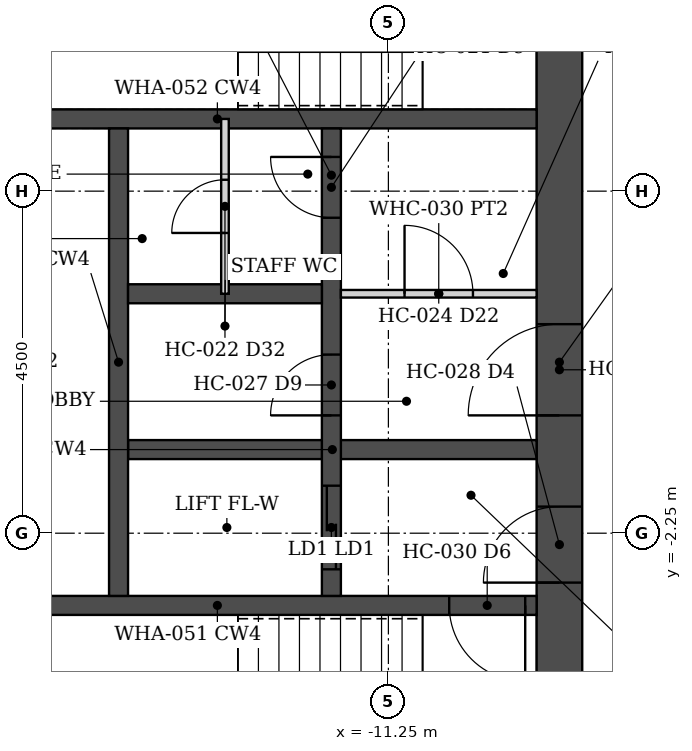
"""IFC4 building model, lengths in metres.
Left out: names, types, materials, properties, quantities, classifications, styles, units other than length and angle.
Written with IfcOpenShell. Run it as: python <this file> out.ifc"""

import sys

from ifc_helpers import new_model, si_unit, direction, frame, frame_2d, origin, place, context, subcontext, project, spatial, rectangle, extrude, element, fill, save


model = new_model("IFC4")
c1 = context("Model", 3, precision=1e-05, world=origin(), true_north=direction((0.0, 1.0)))
c2 = subcontext(c1, "Body", "Model", "MODEL_VIEW")
j1 = project(units=[si_unit("LENGTHUNIT", "METRE"), si_unit("PLANEANGLEUNIT", "RADIAN")], contexts=[c1])
p1 = place(None, origin())
s1 = spatial("IfcSite", under=j1, at=p1, CompositionType="ELEMENT")
p2 = place(p1, origin())
s2 = spatial("IfcBuilding", under=s1, at=p2, CompositionType="ELEMENT")
p3 = place(p2, frame((0.0, 0.0, 140.0)))
s3 = spatial("IfcBuildingStorey", under=s2, at=p3, CompositionType="ELEMENT", Elevation=140.0)
p4 = place(p3, frame((-9.0, -6.45, 0.0), z_axis=(0.0, 0.0, 1.0), x_axis=(0.0, 1.0, 0.0)))
e1 = element("IfcWall", 1, at=p4, inside=s3, PredefinedType="SHEAR", context=c2, shape_type="SweptSolid", body=[
    extrude(rectangle(XDim=12.9, YDim=0.6, at=frame_2d((6.45, 0.0))), origin(), (0.0, 0.0, 1.0), 3.6),
])
p5 = place(p4, frame((3.55, 0.0, 0.0)))
e2 = element("IfcOpeningElement", 2, at=p5, cuts=e1, PredefinedType="OPENING", context=c2, shape_type="SweptSolid", body=[
    extrude(rectangle(XDim=1.0, YDim=2.1, at=frame_2d((0.5, 1.05))), frame((0.0, 0.31, 0.0), z_axis=(0.0, -1.0, 0.0), x_axis=(1.0, 0.0, 0.0)), (0.0, 0.0, 1.0), 0.62),
])
p6 = place(p4, frame((5.75, 0.0, 0.0)))
e3 = element("IfcOpeningElement", 3, at=p6, cuts=e1, PredefinedType="OPENING", context=c2, shape_type="SweptSolid", body=[
    extrude(rectangle(XDim=1.2, YDim=2.1, at=frame_2d((0.6, 1.05))), frame((0.0, 0.31, 0.0), z_axis=(0.0, -1.0, 0.0), x_axis=(1.0, 0.0, 0.0)), (0.0, 0.0, 1.0), 0.62),
])
p7 = place(p4, frame((10.85, 0.0, 0.0)))
e4 = element("IfcOpeningElement", 4, at=p7, cuts=e1, PredefinedType="OPENING", context=c2, shape_type="SweptSolid", body=[
    extrude(rectangle(XDim=1.0, YDim=2.1, at=frame_2d((0.5, 1.05))), frame((0.0, 0.31, 0.0), z_axis=(0.0, -1.0, 0.0), x_axis=(1.0, 0.0, 0.0)), (0.0, 0.0, 1.0), 0.62),
])
p8 = place(p3, frame((-9.3, -3.2, 0.0), z_axis=(0.0, 0.0, 1.0), x_axis=(-1.0, 0.0, 0.0)))
e5 = element("IfcWall", 5, at=p8, inside=s3, PredefinedType="SHEAR", context=c2, shape_type="SweptSolid", body=[
    extrude(rectangle(XDim=8.4, YDim=0.25, at=frame_2d((4.2, 0.0))), origin(), (0.0, 0.0, 1.0), 3.6),
])
p9 = place(p8, frame((0.15, 0.0, 0.0)))
e6 = element("IfcOpeningElement", 6, at=p9, cuts=e5, PredefinedType="OPENING", context=c2, shape_type="SweptSolid", body=[
    extrude(rectangle(XDim=1.0, YDim=2.1, at=frame_2d((0.5, 1.05))), frame((0.0, 0.135, 0.0), z_axis=(0.0, -1.0, 0.0), x_axis=(1.0, 0.0, 0.0)), (0.0, 0.0, 1.0), 0.27),
])
p10 = place(p3, frame((-9.3, 3.2, 0.0), z_axis=(0.0, 0.0, 1.0), x_axis=(-1.0, 0.0, 0.0)))
e7 = element("IfcWall", 7, at=p10, inside=s3, PredefinedType="SHEAR", context=c2, shape_type="SweptSolid", body=[
    extrude(rectangle(XDim=8.4, YDim=0.25, at=frame_2d((4.2, 0.0))), origin(), (0.0, 0.0, 1.0), 3.6),
])
p11 = place(p3, frame((-9.3, -1.15, 0.0), z_axis=(0.0, 0.0, 1.0), x_axis=(-1.0, 0.0, 0.0)))
e8 = element("IfcWall", 8, at=p11, inside=s3, PredefinedType="SHEAR", context=c2, shape_type="SweptSolid", body=[
    extrude(rectangle(XDim=5.375, YDim=0.25, at=frame_2d((2.688, 0.0))), origin(), (0.0, 0.0, 1.0), 3.6),
])
p12 = place(p3, frame((-12.0, -3.075, 0.0), z_axis=(0.0, 0.0, 1.0), x_axis=(0.0, 1.0, 0.0)))
e9 = element("IfcWall", 9, at=p12, inside=s3, PredefinedType="SHEAR", context=c2, shape_type="SweptSolid", body=[
    extrude(rectangle(XDim=6.15, YDim=0.25, at=frame_2d((3.075, 0.0))), origin(), (0.0, 0.0, 1.0), 3.6),
])
p13 = place(p12, frame((2.375, 0.0, 0.0)))
e10 = element("IfcOpeningElement", 10, at=p13, cuts=e9, PredefinedType="OPENING", context=c2, shape_type="SweptSolid", body=[
    extrude(rectangle(XDim=0.8, YDim=2.1, at=frame_2d((0.4, 1.05))), frame((0.0, 0.135, 0.0), z_axis=(0.0, -1.0, 0.0), x_axis=(1.0, 0.0, 0.0)), (0.0, 0.0, 1.0), 0.27),
])
p14 = place(p12, frame((4.975, 0.0, 0.0)))
e11 = element("IfcOpeningElement", 11, at=p14, cuts=e9, PredefinedType="OPENING", context=c2, shape_type="SweptSolid", body=[
    extrude(rectangle(XDim=0.8, YDim=2.1, at=frame_2d((0.4, 1.05))), frame((0.0, 0.135, 0.0), z_axis=(0.0, -1.0, 0.0), x_axis=(1.0, 0.0, 0.0)), (0.0, 0.0, 1.0), 0.27),
])
p15 = place(p12, frame((0.35, 0.0, 0.0)))
e12 = element("IfcOpeningElement", 12, at=p15, cuts=e9, PredefinedType="OPENING", context=c2, shape_type="SweptSolid", body=[
    extrude(rectangle(XDim=1.1, YDim=2.1, at=frame_2d((0.55, 1.05))), frame((0.0, 0.135, 0.0), z_axis=(0.0, -1.0, 0.0), x_axis=(1.0, 0.0, 0.0)), (0.0, 0.0, 1.0), 0.27),
])
p16 = place(p3, frame((-14.8, -3.075, 0.0), z_axis=(0.0, 0.0, 1.0), x_axis=(0.0, 1.0, 0.0)))
e13 = element("IfcWall", 13, at=p16, inside=s3, PredefinedType="SHEAR", context=c2, shape_type="SweptSolid", body=[
    extrude(rectangle(XDim=6.15, YDim=0.25, at=frame_2d((3.075, 0.0))), origin(), (0.0, 0.0, 1.0), 3.6),
])
p17 = place(p3, frame((-12.125, 0.9, 0.0), z_axis=(0.0, 0.0, 1.0), x_axis=(-1.0, 0.0, 0.0)))
e14 = element("IfcWall", 14, at=p17, inside=s3, PredefinedType="SHEAR", context=c2, shape_type="SweptSolid", body=[
    extrude(rectangle(XDim=2.55, YDim=0.25, at=frame_2d((1.275, 0.0))), origin(), (0.0, 0.0, 1.0), 3.6),
])
p18 = place(p3, frame((-11.875, 0.9, 0.0), z_axis=(0.0, 0.0, 1.0), x_axis=(1.0, 0.0, 0.0)))
e15 = element("IfcWall", 15, at=p18, inside=s3, PredefinedType="PARTITIONING", context=c2, shape_type="SweptSolid", body=[
    extrude(rectangle(XDim=2.575, YDim=0.1, at=frame_2d((1.288, 0.0))), origin(), (0.0, 0.0, 1.0), 2.473),
])
p19 = place(p18, frame((0.837, 0.0, 0.0)))
e16 = element("IfcOpeningElement", 16, at=p19, cuts=e15, PredefinedType="OPENING", context=c2, shape_type="SweptSolid", body=[
    extrude(rectangle(XDim=0.9, YDim=2.1, at=frame_2d((0.45, 1.05))), frame((0.0, 0.06, 0.0), z_axis=(0.0, -1.0, 0.0), x_axis=(1.0, 0.0, 0.0)), (0.0, 0.0, 1.0), 0.12),
])
p20 = place(p3, frame((-13.4, 0.9, 0.0), z_axis=(0.0, 0.0, 1.0), x_axis=(0.0, 1.0, 0.0)))
e17 = element("IfcWall", 17, at=p20, inside=s3, PredefinedType="PARTITIONING", context=c2, shape_type="SweptSolid", body=[
    extrude(rectangle(XDim=2.3, YDim=0.1, at=frame_2d((1.15, 0.0))), origin(), (0.0, 0.0, 1.0), 2.473),
])
p21 = place(p20, frame((0.8, 0.0, 0.0)))
e18 = element("IfcOpeningElement", 18, at=p21, cuts=e17, PredefinedType="OPENING", context=c2, shape_type="SweptSolid", body=[
    extrude(rectangle(XDim=0.7, YDim=2.1, at=frame_2d((0.35, 1.05))), frame((0.0, 0.06, 0.0), z_axis=(0.0, -1.0, 0.0), x_axis=(1.0, 0.0, 0.0)), (0.0, 0.0, 1.0), 0.12),
])
p22 = place(p5, origin())
e19 = element("IfcDoor", 19, at=p22, inside=s3, OperationType="SINGLE_SWING_LEFT", PredefinedType="DOOR", context=c2, shape_type="SweptSolid", body=[
    extrude(rectangle(XDim=1.0, YDim=2.1, at=frame_2d((0.5, 1.05))), frame((0.0, 0.025, 0.0), z_axis=(0.0, -1.0, 0.0), x_axis=(1.0, 0.0, 0.0)), (0.0, 0.0, 1.0), 0.05),
])
fill(e2, e19)
p23 = place(p9, origin())
e20 = element("IfcDoor", 20, at=p23, inside=s3, OperationType="SINGLE_SWING_LEFT", PredefinedType="DOOR", context=c2, shape_type="SweptSolid", body=[
    extrude(rectangle(XDim=1.0, YDim=2.1, at=frame_2d((0.5, 1.05))), frame((0.0, 0.025, 0.0), z_axis=(0.0, -1.0, 0.0), x_axis=(1.0, 0.0, 0.0)), (0.0, 0.0, 1.0), 0.05),
])
fill(e6, e20)
p24 = place(p19, origin())
e21 = element("IfcDoor", 21, at=p24, inside=s3, OperationType="SINGLE_SWING_LEFT", PredefinedType="DOOR", context=c2, shape_type="SweptSolid", body=[
    extrude(rectangle(XDim=0.9, YDim=2.1, at=frame_2d((0.45, 1.05))), frame((0.0, 0.025, 0.0), z_axis=(0.0, -1.0, 0.0), x_axis=(1.0, 0.0, 0.0)), (0.0, 0.0, 1.0), 0.05),
])
fill(e16, e21)
p25 = place(p6, origin())
e22 = element("IfcDoor", 22, at=p25, inside=s3, OperationType="SINGLE_SWING_LEFT", PredefinedType="DOOR", context=c2, shape_type="SweptSolid", body=[
    extrude(rectangle(XDim=1.2, YDim=2.1, at=frame_2d((0.6, 1.05))), frame((0.0, 0.025, 0.0), z_axis=(0.0, -1.0, 0.0), x_axis=(1.0, 0.0, 0.0)), (0.0, 0.0, 1.0), 0.05),
])
fill(e3, e22)
p26 = place(p13, origin())
e23 = element("IfcDoor", 23, at=p26, inside=s3, OperationType="SINGLE_SWING_LEFT", PredefinedType="DOOR", context=c2, shape_type="SweptSolid", body=[
    extrude(rectangle(XDim=0.8, YDim=2.1, at=frame_2d((0.4, 1.05))), frame((0.0, 0.025, 0.0), z_axis=(0.0, -1.0, 0.0), x_axis=(1.0, 0.0, 0.0)), (0.0, 0.0, 1.0), 0.05),
])
fill(e10, e23)
p27 = place(p21, origin())
e24 = element("IfcDoor", 24, at=p27, inside=s3, OperationType="SINGLE_SWING_LEFT", PredefinedType="DOOR", context=c2, shape_type="SweptSolid", body=[
    extrude(rectangle(XDim=0.7, YDim=2.1, at=frame_2d((0.35, 1.05))), frame((0.0, 0.025, 0.0), z_axis=(0.0, -1.0, 0.0), x_axis=(1.0, 0.0, 0.0)), (0.0, 0.0, 1.0), 0.05),
])
fill(e18, e24)
p28 = place(p14, origin())
e25 = element("IfcDoor", 25, at=p28, inside=s3, OperationType="SINGLE_SWING_RIGHT", PredefinedType="DOOR", context=c2, shape_type="SweptSolid", body=[
    extrude(rectangle(XDim=0.8, YDim=2.1, at=frame_2d((0.4, 1.05))), frame((0.0, 0.025, 0.0), z_axis=(0.0, -1.0, 0.0), x_axis=(1.0, 0.0, 0.0)), (0.0, 0.0, 1.0), 0.05),
])
fill(e11, e25)
p29 = place(p15, origin())
e26 = element("IfcDoor", 26, at=p29, inside=s3, OperationType="DOUBLE_DOOR_SLIDING", PredefinedType="DOOR", context=c2, shape_type="SweptSolid", body=[
    extrude(rectangle(XDim=1.1, YDim=2.1, at=frame_2d((0.55, 1.05))), frame((0.0, 0.025, 0.0), z_axis=(0.0, -1.0, 0.0), x_axis=(1.0, 0.0, 0.0)), (0.0, 0.0, 1.0), 0.05),
])
fill(e12, e26)
save(model, sys.argv[1])
